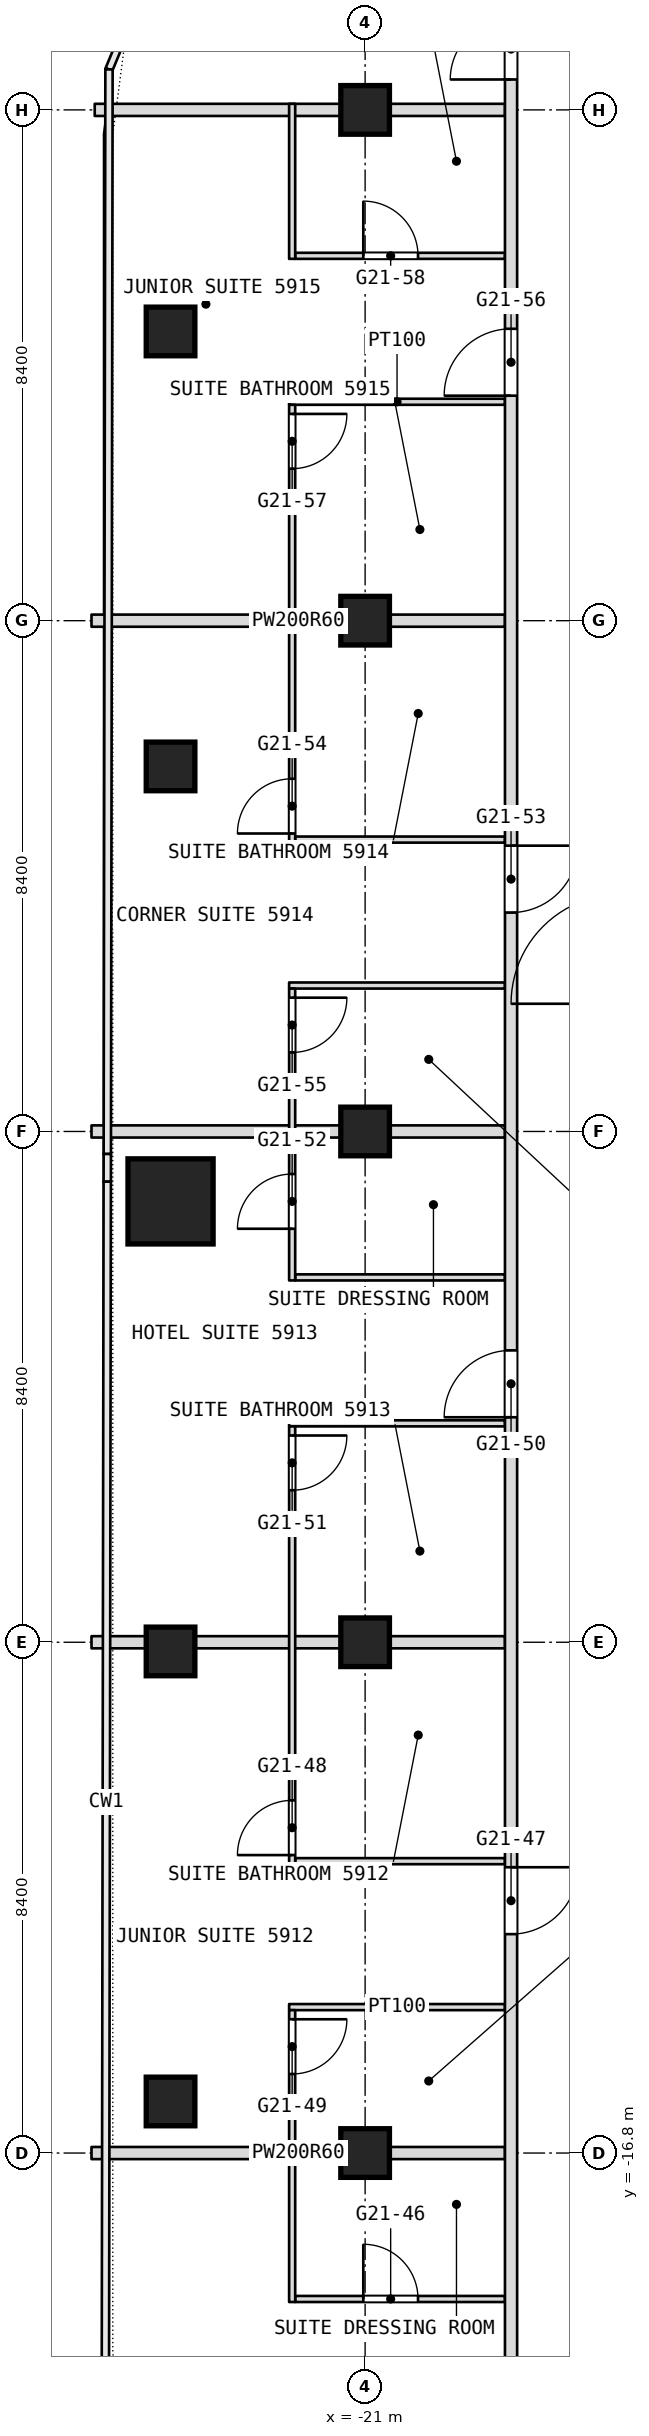
"""IFC4 building model, lengths in metres.
Left out: names, types, materials, properties, quantities, classifications, styles, units other than length and angle.
Written with IfcOpenShell. Run it as: python <this file> out.ifc"""

import sys

from ifc_helpers import new_model, si_unit, direction, frame, frame_2d, origin, origin_2d, place, context, subcontext, project, spatial, rectangle, extrude, element, fill, save


model = new_model("IFC4")
c1 = context("Model", 3, precision=1e-05, world=origin(), true_north=direction((0.0, 1.0)))
c2 = subcontext(c1, "Body", "Model", "MODEL_VIEW")
j1 = project(units=[si_unit("LENGTHUNIT", "METRE"), si_unit("PLANEANGLEUNIT", "RADIAN")], contexts=[c1])
p1 = place(None, origin())
s1 = spatial("IfcSite", under=j1, at=p1, CompositionType="ELEMENT")
p2 = place(p1, origin())
s2 = spatial("IfcBuilding", under=s1, at=p2, CompositionType="ELEMENT")
p3 = place(p2, frame((0.0, 0.0, 248.9)))
s3 = spatial("IfcBuildingStorey", under=s2, at=p3, CompositionType="ELEMENT", Elevation=248.9)
p4 = place(p3, frame((-24.2, -1.15, 0.0), z_axis=(0.0, 0.0, 1.0), x_axis=(1.0, 0.0, 0.0)))
e1 = element("IfcColumn", 1, at=p4, inside=s3, PredefinedType="COLUMN", context=c2, shape_type="SweptSolid", body=[
    extrude(rectangle(XDim=1.4, YDim=1.4, at=origin_2d()), origin(), (0.0, 0.0, 1.0), 3.6),
])
for number, where, z_axis, x_axis in (
    (2, (-21.0, -16.8, 0.0), (0.0, 0.0, 1.0), (1.0, 0.0, 0.0)),
    (3, (-21.0, -8.4, 0.0), (0.0, 0.0, 1.0), (1.0, 0.0, 0.0)),
    (4, (-21.0, 0.0, 0.0), (0.0, 0.0, 1.0), (1.0, 0.0, 0.0)),
    (5, (-21.0, 8.4, 0.0), (0.0, 0.0, 1.0), (1.0, 0.0, 0.0)),
    (6, (-21.0, 16.8, 0.0), (0.0, 0.0, 1.0), (1.0, 0.0, 0.0)),
    (7, (-24.2, -15.952, 0.0), (0.0, 0.0, 1.0), (1.0, 0.0, 0.0)),
    (8, (-24.2, -8.551, 0.0), (0.0, 0.0, 1.0), (1.0, 0.0, 0.0)),
    (9, (-24.2, 6.003, 0.0), (0.0, 0.0, 1.0), (1.0, 0.0, 0.0)),
    (10, (-24.2, 13.156, 0.0), (0.0, 0.0, 1.0), (1.0, 0.0, 0.0)),
):
    element("IfcColumn", number, at=place(p3, frame(where, z_axis=z_axis, x_axis=x_axis)), inside=s3, PredefinedType="COLUMN", context=c2, shape_type="SweptSolid", body=[
        extrude(rectangle(XDim=0.8, YDim=0.8, at=origin_2d()), origin(), (0.0, 0.0, 1.0), 3.6),
    ])
p5 = place(p3, frame((-22.15, -19.2, 0.0), z_axis=(0.0, 0.0, 1.0), x_axis=(1.0, 0.0, 0.0)))
e11 = element("IfcWall", 11, at=p5, inside=s3, PredefinedType="PARTITIONING", context=c2, shape_type="SweptSolid", body=[
    extrude(rectangle(XDim=3.45, YDim=0.1, at=frame_2d((1.725, 0.0))), origin(), (0.0, 0.0, 1.0), 3.3),
])
p6 = place(p5, frame((1.12, 0.0, 0.0)))
e12 = element("IfcOpeningElement", 12, at=p6, cuts=e11, PredefinedType="OPENING", context=c2, shape_type="SweptSolid", body=[
    extrude(rectangle(XDim=0.9, YDim=2.1, at=frame_2d((0.45, 1.05))), frame((0.0, 0.05, 0.0), z_axis=(0.0, -1.0, 0.0), x_axis=(1.0, 0.0, 0.0)), (0.0, 0.0, 1.0), 0.1),
])
p7 = place(p3, frame((-25.5, -16.8, 0.0), z_axis=(0.0, 0.0, 1.0), x_axis=(1.0, 0.0, 0.0)))
e13 = element("IfcWall", 13, at=p7, inside=s3, PredefinedType="PARTITIONING", context=c2, shape_type="SweptSolid", body=[
    extrude(rectangle(XDim=6.8, YDim=0.2, at=frame_2d((3.4, 0.0))), origin(), (0.0, 0.0, 1.0), 2.9),
])
p8 = place(p3, frame((-22.25, -14.4, 0.0), z_axis=(0.0, 0.0, 1.0), x_axis=(1.0, 0.0, 0.0)))
e14 = element("IfcWall", 14, at=p8, inside=s3, PredefinedType="PARTITIONING", context=c2, shape_type="SweptSolid", body=[
    extrude(rectangle(XDim=3.55, YDim=0.1, at=frame_2d((1.775, 0.0))), origin(), (0.0, 0.0, 1.0), 3.3),
])
p9 = place(p3, frame((-22.15, -12.0, 0.0), z_axis=(0.0, 0.0, 1.0), x_axis=(1.0, 0.0, 0.0)))
e15 = element("IfcWall", 15, at=p9, inside=s3, PredefinedType="PARTITIONING", context=c2, shape_type="SweptSolid", body=[
    extrude(rectangle(XDim=3.45, YDim=0.1, at=frame_2d((1.725, 0.0))), origin(), (0.0, 0.0, 1.0), 3.3),
])
p10 = place(p3, frame((-25.5, -8.4, 0.0), z_axis=(0.0, 0.0, 1.0), x_axis=(1.0, 0.0, 0.0)))
e16 = element("IfcWall", 16, at=p10, inside=s3, PredefinedType="PARTITIONING", context=c2, shape_type="SweptSolid", body=[
    extrude(rectangle(XDim=6.8, YDim=0.2, at=frame_2d((3.4, 0.0))), origin(), (0.0, 0.0, 1.0), 2.9),
])
p11 = place(p3, frame((-22.25, -4.8, 0.0), z_axis=(0.0, 0.0, 1.0), x_axis=(1.0, 0.0, 0.0)))
e17 = element("IfcWall", 17, at=p11, inside=s3, PredefinedType="PARTITIONING", context=c2, shape_type="SweptSolid", body=[
    extrude(rectangle(XDim=3.55, YDim=0.1, at=frame_2d((1.775, 0.0))), origin(), (0.0, 0.0, 1.0), 3.3),
])
p12 = place(p3, frame((-22.15, -2.4, 0.0), z_axis=(0.0, 0.0, 1.0), x_axis=(1.0, 0.0, 0.0)))
e18 = element("IfcWall", 18, at=p12, inside=s3, PredefinedType="PARTITIONING", context=c2, shape_type="SweptSolid", body=[
    extrude(rectangle(XDim=3.45, YDim=0.1, at=frame_2d((1.725, 0.0))), origin(), (0.0, 0.0, 1.0), 3.3),
])
p13 = place(p3, frame((-25.5, 0.0, 0.0), z_axis=(0.0, 0.0, 1.0), x_axis=(1.0, 0.0, 0.0)))
e19 = element("IfcWall", 19, at=p13, inside=s3, PredefinedType="PARTITIONING", context=c2, shape_type="SweptSolid", body=[
    extrude(rectangle(XDim=6.8, YDim=0.2, at=frame_2d((3.4, 0.0))), origin(), (0.0, 0.0, 1.0), 2.9),
])
p14 = place(p3, frame((-22.25, 2.4, 0.0), z_axis=(0.0, 0.0, 1.0), x_axis=(1.0, 0.0, 0.0)))
e20 = element("IfcWall", 20, at=p14, inside=s3, PredefinedType="PARTITIONING", context=c2, shape_type="SweptSolid", body=[
    extrude(rectangle(XDim=3.55, YDim=0.1, at=frame_2d((1.775, 0.0))), origin(), (0.0, 0.0, 1.0), 3.3),
])
p15 = place(p3, frame((-22.15, 4.8, 0.0), z_axis=(0.0, 0.0, 1.0), x_axis=(1.0, 0.0, 0.0)))
e21 = element("IfcWall", 21, at=p15, inside=s3, PredefinedType="PARTITIONING", context=c2, shape_type="SweptSolid", body=[
    extrude(rectangle(XDim=3.45, YDim=0.1, at=frame_2d((1.725, 0.0))), origin(), (0.0, 0.0, 1.0), 3.3),
])
p16 = place(p3, frame((-25.5, 8.4, 0.0), z_axis=(0.0, 0.0, 1.0), x_axis=(1.0, 0.0, 0.0)))
e22 = element("IfcWall", 22, at=p16, inside=s3, PredefinedType="PARTITIONING", context=c2, shape_type="SweptSolid", body=[
    extrude(rectangle(XDim=6.8, YDim=0.2, at=frame_2d((3.4, 0.0))), origin(), (0.0, 0.0, 1.0), 2.9),
])
p17 = place(p3, frame((-22.25, 12.0, 0.0), z_axis=(0.0, 0.0, 1.0), x_axis=(1.0, 0.0, 0.0)))
e23 = element("IfcWall", 23, at=p17, inside=s3, PredefinedType="PARTITIONING", context=c2, shape_type="SweptSolid", body=[
    extrude(rectangle(XDim=3.55, YDim=0.1, at=frame_2d((1.775, 0.0))), origin(), (0.0, 0.0, 1.0), 3.3),
])
p18 = place(p3, frame((-22.15, 14.4, 0.0), z_axis=(0.0, 0.0, 1.0), x_axis=(1.0, 0.0, 0.0)))
e24 = element("IfcWall", 24, at=p18, inside=s3, PredefinedType="PARTITIONING", context=c2, shape_type="SweptSolid", body=[
    extrude(rectangle(XDim=3.45, YDim=0.1, at=frame_2d((1.725, 0.0))), origin(), (0.0, 0.0, 1.0), 3.3),
])
p19 = place(p18, frame((1.12, 0.0, 0.0)))
e25 = element("IfcOpeningElement", 25, at=p19, cuts=e24, PredefinedType="OPENING", context=c2, shape_type="SweptSolid", body=[
    extrude(rectangle(XDim=0.9, YDim=2.1, at=frame_2d((0.45, 1.05))), frame((0.0, 0.05, 0.0), z_axis=(0.0, -1.0, 0.0), x_axis=(1.0, 0.0, 0.0)), (0.0, 0.0, 1.0), 0.1),
])
p20 = place(p3, frame((-25.447, 16.8, 0.0), z_axis=(0.0, 0.0, 1.0), x_axis=(1.0, 0.0, 0.0)))
e26 = element("IfcWall", 26, at=p20, inside=s3, PredefinedType="PARTITIONING", context=c2, shape_type="SweptSolid", body=[
    extrude(rectangle(XDim=6.747, YDim=0.2, at=frame_2d((3.374, 0.0))), origin(), (0.0, 0.0, 1.0), 2.9),
])
p21 = place(p3, frame((-18.6, -26.751, 0.0), z_axis=(0.0, 0.0, 1.0), x_axis=(0.0, 1.0, 0.0)))
e27 = element("IfcWall", 27, at=p21, inside=s3, PredefinedType="PARTITIONING", context=c2, shape_type="SweptSolid", body=[
    extrude(rectangle(XDim=49.091, YDim=0.2, at=frame_2d((24.545, 0.0))), origin(), (0.0, 0.0, 1.0), 3.3),
])
p22 = place(p21, frame((4.576, 0.0, 0.0)))
e28 = element("IfcOpeningElement", 28, at=p22, cuts=e27, PredefinedType="OPENING", context=c2, shape_type="SweptSolid", body=[
    extrude(rectangle(XDim=1.1, YDim=2.1, at=frame_2d((0.55, 1.05))), frame((0.0, 0.1, 0.0), z_axis=(0.0, -1.0, 0.0), x_axis=(1.0, 0.0, 0.0)), (0.0, 0.0, 1.0), 0.2),
])
p23 = place(p21, frame((13.551, 0.0, 0.0)))
e29 = element("IfcOpeningElement", 29, at=p23, cuts=e27, PredefinedType="OPENING", context=c2, shape_type="SweptSolid", body=[
    extrude(rectangle(XDim=1.1, YDim=2.1, at=frame_2d((0.55, 1.05))), frame((0.0, 0.1, 0.0), z_axis=(0.0, -1.0, 0.0), x_axis=(1.0, 0.0, 0.0)), (0.0, 0.0, 1.0), 0.2),
])
p24 = place(p21, frame((22.051, 0.0, 0.0)))
e30 = element("IfcOpeningElement", 30, at=p24, cuts=e27, PredefinedType="OPENING", context=c2, shape_type="SweptSolid", body=[
    extrude(rectangle(XDim=1.1, YDim=2.1, at=frame_2d((0.55, 1.05))), frame((0.0, 0.1, 0.0), z_axis=(0.0, -1.0, 0.0), x_axis=(1.0, 0.0, 0.0)), (0.0, 0.0, 1.0), 0.2),
])
p25 = place(p21, frame((30.351, 0.0, 0.0)))
e31 = element("IfcOpeningElement", 31, at=p25, cuts=e27, PredefinedType="OPENING", context=c2, shape_type="SweptSolid", body=[
    extrude(rectangle(XDim=1.1, YDim=2.1, at=frame_2d((0.55, 1.05))), frame((0.0, 0.1, 0.0), z_axis=(0.0, -1.0, 0.0), x_axis=(1.0, 0.0, 0.0)), (0.0, 0.0, 1.0), 0.2),
])
p26 = place(p21, frame((38.851, 0.0, 0.0)))
e32 = element("IfcOpeningElement", 32, at=p26, cuts=e27, PredefinedType="OPENING", context=c2, shape_type="SweptSolid", body=[
    extrude(rectangle(XDim=1.1, YDim=2.1, at=frame_2d((0.55, 1.05))), frame((0.0, 0.1, 0.0), z_axis=(0.0, -1.0, 0.0), x_axis=(1.0, 0.0, 0.0)), (0.0, 0.0, 1.0), 0.2),
])
p27 = place(p21, frame((44.051, 0.0, 0.0)))
e33 = element("IfcOpeningElement", 33, at=p27, cuts=e27, PredefinedType="OPENING", context=c2, shape_type="SweptSolid", body=[
    extrude(rectangle(XDim=1.0, YDim=2.1, at=frame_2d((0.5, 1.05))), frame((0.0, 0.1, 0.0), z_axis=(0.0, -1.0, 0.0), x_axis=(1.0, 0.0, 0.0)), (0.0, 0.0, 1.0), 0.2),
])
p28 = place(p3, frame((-22.2, -19.25, 0.0), z_axis=(0.0, 0.0, 1.0), x_axis=(0.0, 1.0, 0.0)))
e34 = element("IfcWall", 34, at=p28, inside=s3, PredefinedType="PARTITIONING", context=c2, shape_type="SweptSolid", body=[
    extrude(rectangle(XDim=4.8, YDim=0.1, at=frame_2d((2.4, 0.0))), origin(), (0.0, 0.0, 1.0), 3.3),
])
p29 = place(p28, frame((3.75, 0.0, 0.0)))
e35 = element("IfcOpeningElement", 35, at=p29, cuts=e34, PredefinedType="OPENING", context=c2, shape_type="SweptSolid", body=[
    extrude(rectangle(XDim=0.9, YDim=2.1, at=frame_2d((0.45, 1.05))), frame((0.0, 0.05, 0.0), z_axis=(0.0, -1.0, 0.0), x_axis=(1.0, 0.0, 0.0)), (0.0, 0.0, 1.0), 0.1),
])
p30 = place(p3, frame((-22.2, -12.05, 0.0), z_axis=(0.0, 0.0, 1.0), x_axis=(0.0, 1.0, 0.0)))
e36 = element("IfcWall", 36, at=p30, inside=s3, PredefinedType="PARTITIONING", context=c2, shape_type="SweptSolid", body=[
    extrude(rectangle(XDim=7.2, YDim=0.1, at=frame_2d((3.6, 0.0))), origin(), (0.0, 0.0, 1.0), 3.3),
])
p31 = place(p30, frame((0.15, 0.0, 0.0)))
e37 = element("IfcOpeningElement", 37, at=p31, cuts=e36, PredefinedType="OPENING", context=c2, shape_type="SweptSolid", body=[
    extrude(rectangle(XDim=0.9, YDim=2.1, at=frame_2d((0.45, 1.05))), frame((0.0, 0.05, 0.0), z_axis=(0.0, -1.0, 0.0), x_axis=(1.0, 0.0, 0.0)), (0.0, 0.0, 1.0), 0.1),
])
p32 = place(p30, frame((6.15, 0.0, 0.0)))
e38 = element("IfcOpeningElement", 38, at=p32, cuts=e36, PredefinedType="OPENING", context=c2, shape_type="SweptSolid", body=[
    extrude(rectangle(XDim=0.9, YDim=2.1, at=frame_2d((0.45, 1.05))), frame((0.0, 0.05, 0.0), z_axis=(0.0, -1.0, 0.0), x_axis=(1.0, 0.0, 0.0)), (0.0, 0.0, 1.0), 0.1),
])
p33 = place(p3, frame((-22.2, -2.45, 0.0), z_axis=(0.0, 0.0, 1.0), x_axis=(0.0, 1.0, 0.0)))
e39 = element("IfcWall", 39, at=p33, inside=s3, PredefinedType="PARTITIONING", context=c2, shape_type="SweptSolid", body=[
    extrude(rectangle(XDim=4.8, YDim=0.1, at=frame_2d((2.4, 0.0))), origin(), (0.0, 0.0, 1.0), 3.3),
])
p34 = place(p33, frame((0.85, 0.0, 0.0)))
e40 = element("IfcOpeningElement", 40, at=p34, cuts=e39, PredefinedType="OPENING", context=c2, shape_type="SweptSolid", body=[
    extrude(rectangle(XDim=0.9, YDim=2.1, at=frame_2d((0.45, 1.05))), frame((0.0, 0.05, 0.0), z_axis=(0.0, -1.0, 0.0), x_axis=(1.0, 0.0, 0.0)), (0.0, 0.0, 1.0), 0.1),
])
p35 = place(p33, frame((3.75, 0.0, 0.0)))
e41 = element("IfcOpeningElement", 41, at=p35, cuts=e39, PredefinedType="OPENING", context=c2, shape_type="SweptSolid", body=[
    extrude(rectangle(XDim=0.9, YDim=2.1, at=frame_2d((0.45, 1.05))), frame((0.0, 0.05, 0.0), z_axis=(0.0, -1.0, 0.0), x_axis=(1.0, 0.0, 0.0)), (0.0, 0.0, 1.0), 0.1),
])
p36 = place(p3, frame((-22.2, 4.75, 0.0), z_axis=(0.0, 0.0, 1.0), x_axis=(0.0, 1.0, 0.0)))
e42 = element("IfcWall", 42, at=p36, inside=s3, PredefinedType="PARTITIONING", context=c2, shape_type="SweptSolid", body=[
    extrude(rectangle(XDim=7.2, YDim=0.1, at=frame_2d((3.6, 0.0))), origin(), (0.0, 0.0, 1.0), 3.3),
])
p37 = place(p36, frame((0.15, 0.0, 0.0)))
e43 = element("IfcOpeningElement", 43, at=p37, cuts=e42, PredefinedType="OPENING", context=c2, shape_type="SweptSolid", body=[
    extrude(rectangle(XDim=0.9, YDim=2.1, at=frame_2d((0.45, 1.05))), frame((0.0, 0.05, 0.0), z_axis=(0.0, -1.0, 0.0), x_axis=(1.0, 0.0, 0.0)), (0.0, 0.0, 1.0), 0.1),
])
p38 = place(p36, frame((6.15, 0.0, 0.0)))
e44 = element("IfcOpeningElement", 44, at=p38, cuts=e42, PredefinedType="OPENING", context=c2, shape_type="SweptSolid", body=[
    extrude(rectangle(XDim=0.9, YDim=2.1, at=frame_2d((0.45, 1.05))), frame((0.0, 0.05, 0.0), z_axis=(0.0, -1.0, 0.0), x_axis=(1.0, 0.0, 0.0)), (0.0, 0.0, 1.0), 0.1),
])
p39 = place(p3, frame((-22.2, 14.35, 0.0), z_axis=(0.0, 0.0, 1.0), x_axis=(0.0, 1.0, 0.0)))
e45 = element("IfcWall", 45, at=p39, inside=s3, PredefinedType="PARTITIONING", context=c2, shape_type="SweptSolid", body=[
    extrude(rectangle(XDim=2.55, YDim=0.1, at=frame_2d((1.275, 0.0))), origin(), (0.0, 0.0, 1.0), 3.3),
])
p40 = place(p6, origin())
e46 = element("IfcDoor", 46, at=p40, inside=s3, OperationType="SINGLE_SWING_LEFT", PredefinedType="DOOR", context=c2, shape_type="SweptSolid", body=[
    extrude(rectangle(XDim=0.9, YDim=2.1, at=frame_2d((0.45, 1.05))), frame((0.0, 0.025, 0.0), z_axis=(0.0, -1.0, 0.0), x_axis=(1.0, 0.0, 0.0)), (0.0, 0.0, 1.0), 0.05),
])
fill(e12, e46)
p41 = place(p19, origin())
e47 = element("IfcDoor", 47, at=p41, inside=s3, OperationType="SINGLE_SWING_LEFT", PredefinedType="DOOR", context=c2, shape_type="SweptSolid", body=[
    extrude(rectangle(XDim=0.9, YDim=2.1, at=frame_2d((0.45, 1.05))), frame((0.0, 0.025, 0.0), z_axis=(0.0, -1.0, 0.0), x_axis=(1.0, 0.0, 0.0)), (0.0, 0.0, 1.0), 0.05),
])
fill(e25, e47)
p42 = place(p23, origin())
e48 = element("IfcDoor", 48, at=p42, inside=s3, OperationType="SINGLE_SWING_RIGHT", PredefinedType="DOOR", context=c2, shape_type="SweptSolid", body=[
    extrude(rectangle(XDim=1.1, YDim=2.1, at=frame_2d((0.55, 1.05))), frame((0.0, 0.025, 0.0), z_axis=(0.0, -1.0, 0.0), x_axis=(1.0, 0.0, 0.0)), (0.0, 0.0, 1.0), 0.05),
])
fill(e29, e48)
p43 = place(p24, origin())
e49 = element("IfcDoor", 49, at=p43, inside=s3, OperationType="SINGLE_SWING_LEFT", PredefinedType="DOOR", context=c2, shape_type="SweptSolid", body=[
    extrude(rectangle(XDim=1.1, YDim=2.1, at=frame_2d((0.55, 1.05))), frame((0.0, 0.025, 0.0), z_axis=(0.0, -1.0, 0.0), x_axis=(1.0, 0.0, 0.0)), (0.0, 0.0, 1.0), 0.05),
])
fill(e30, e49)
p44 = place(p25, origin())
e50 = element("IfcDoor", 50, at=p44, inside=s3, OperationType="SINGLE_SWING_RIGHT", PredefinedType="DOOR", context=c2, shape_type="SweptSolid", body=[
    extrude(rectangle(XDim=1.1, YDim=2.1, at=frame_2d((0.55, 1.05))), frame((0.0, 0.025, 0.0), z_axis=(0.0, -1.0, 0.0), x_axis=(1.0, 0.0, 0.0)), (0.0, 0.0, 1.0), 0.05),
])
fill(e31, e50)
p45 = place(p26, origin())
e51 = element("IfcDoor", 51, at=p45, inside=s3, OperationType="SINGLE_SWING_LEFT", PredefinedType="DOOR", context=c2, shape_type="SweptSolid", body=[
    extrude(rectangle(XDim=1.1, YDim=2.1, at=frame_2d((0.55, 1.05))), frame((0.0, 0.025, 0.0), z_axis=(0.0, -1.0, 0.0), x_axis=(1.0, 0.0, 0.0)), (0.0, 0.0, 1.0), 0.05),
])
fill(e32, e51)
p46 = place(p27, origin())
e52 = element("IfcDoor", 52, at=p46, inside=s3, OperationType="SINGLE_SWING_RIGHT", PredefinedType="DOOR", context=c2, shape_type="SweptSolid", body=[
    extrude(rectangle(XDim=1.0, YDim=2.1, at=frame_2d((0.5, 1.05))), frame((0.0, 0.025, 0.0), z_axis=(0.0, -1.0, 0.0), x_axis=(1.0, 0.0, 0.0)), (0.0, 0.0, 1.0), 0.05),
])
fill(e33, e52)
p47 = place(p29, origin())
e53 = element("IfcDoor", 53, at=p47, inside=s3, OperationType="SINGLE_SWING_LEFT", PredefinedType="DOOR", context=c2, shape_type="SweptSolid", body=[
    extrude(rectangle(XDim=0.9, YDim=2.1, at=frame_2d((0.45, 1.05))), frame((0.0, 0.025, 0.0), z_axis=(0.0, -1.0, 0.0), x_axis=(1.0, 0.0, 0.0)), (0.0, 0.0, 1.0), 0.05),
])
fill(e35, e53)
p48 = place(p31, origin())
e54 = element("IfcDoor", 54, at=p48, inside=s3, OperationType="SINGLE_SWING_RIGHT", PredefinedType="DOOR", context=c2, shape_type="SweptSolid", body=[
    extrude(rectangle(XDim=0.9, YDim=2.1, at=frame_2d((0.45, 1.05))), frame((0.0, 0.025, 0.0), z_axis=(0.0, -1.0, 0.0), x_axis=(1.0, 0.0, 0.0)), (0.0, 0.0, 1.0), 0.05),
])
fill(e37, e54)
p49 = place(p32, origin())
e55 = element("IfcDoor", 55, at=p49, inside=s3, OperationType="SINGLE_SWING_LEFT", PredefinedType="DOOR", context=c2, shape_type="SweptSolid", body=[
    extrude(rectangle(XDim=0.9, YDim=2.1, at=frame_2d((0.45, 1.05))), frame((0.0, 0.025, 0.0), z_axis=(0.0, -1.0, 0.0), x_axis=(1.0, 0.0, 0.0)), (0.0, 0.0, 1.0), 0.05),
])
fill(e38, e55)
p50 = place(p34, origin())
e56 = element("IfcDoor", 56, at=p50, inside=s3, OperationType="SINGLE_SWING_LEFT", PredefinedType="DOOR", context=c2, shape_type="SweptSolid", body=[
    extrude(rectangle(XDim=0.9, YDim=2.1, at=frame_2d((0.45, 1.05))), frame((0.0, 0.025, 0.0), z_axis=(0.0, -1.0, 0.0), x_axis=(1.0, 0.0, 0.0)), (0.0, 0.0, 1.0), 0.05),
])
fill(e40, e56)
p51 = place(p35, origin())
e57 = element("IfcDoor", 57, at=p51, inside=s3, OperationType="SINGLE_SWING_LEFT", PredefinedType="DOOR", context=c2, shape_type="SweptSolid", body=[
    extrude(rectangle(XDim=0.9, YDim=2.1, at=frame_2d((0.45, 1.05))), frame((0.0, 0.025, 0.0), z_axis=(0.0, -1.0, 0.0), x_axis=(1.0, 0.0, 0.0)), (0.0, 0.0, 1.0), 0.05),
])
fill(e41, e57)
p52 = place(p37, origin())
e58 = element("IfcDoor", 58, at=p52, inside=s3, OperationType="SINGLE_SWING_RIGHT", PredefinedType="DOOR", context=c2, shape_type="SweptSolid", body=[
    extrude(rectangle(XDim=0.9, YDim=2.1, at=frame_2d((0.45, 1.05))), frame((0.0, 0.025, 0.0), z_axis=(0.0, -1.0, 0.0), x_axis=(1.0, 0.0, 0.0)), (0.0, 0.0, 1.0), 0.05),
])
fill(e43, e58)
p53 = place(p38, origin())
e59 = element("IfcDoor", 59, at=p53, inside=s3, OperationType="SINGLE_SWING_LEFT", PredefinedType="DOOR", context=c2, shape_type="SweptSolid", body=[
    extrude(rectangle(XDim=0.9, YDim=2.1, at=frame_2d((0.45, 1.05))), frame((0.0, 0.025, 0.0), z_axis=(0.0, -1.0, 0.0), x_axis=(1.0, 0.0, 0.0)), (0.0, 0.0, 1.0), 0.05),
])
fill(e44, e59)
save(model, sys.argv[1])
